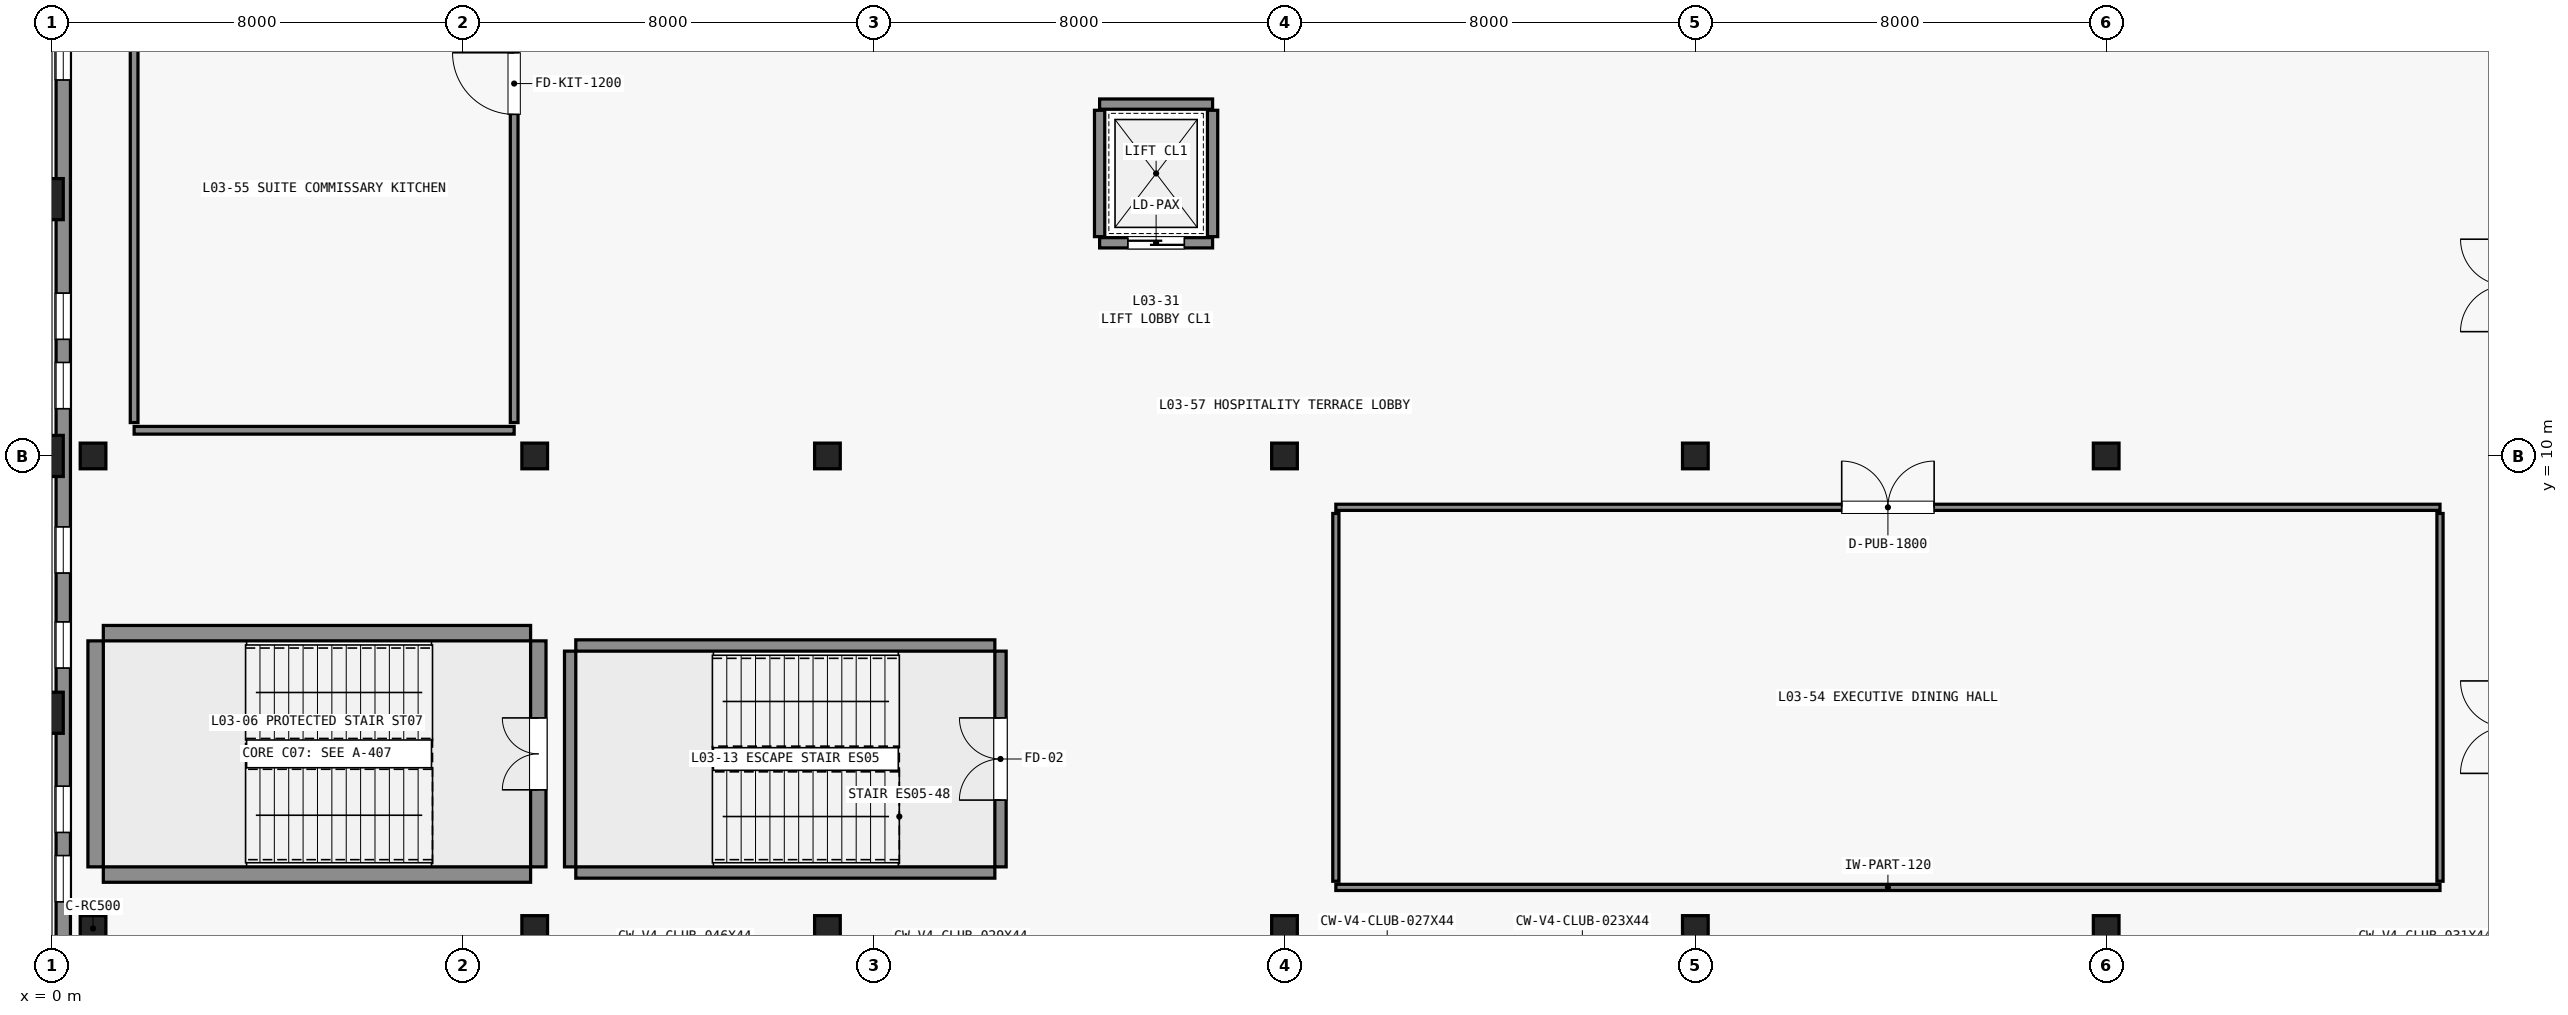
"""IFC4 building model, lengths in metres.
Left out: names, types, materials, properties, quantities, classifications, styles, units other than length and angle.
Written with IfcOpenShell. Run it as: python <this file> out.ifc"""

import sys

from ifc_helpers import new_model, si_unit, direction, frame, frame_2d, origin, origin_2d, place, context, subcontext, project, spatial, rectangle, extrude, element, fill, save


model = new_model("IFC4")
c1 = context("Model", 3, precision=1e-05, world=origin(), true_north=direction((0.0, 1.0)))
c2 = subcontext(c1, "Body", "Model", "MODEL_VIEW")
j1 = project(units=[si_unit("LENGTHUNIT", "METRE"), si_unit("PLANEANGLEUNIT", "RADIAN")], contexts=[c1])
p1 = place(None, origin())
s1 = spatial("IfcSite", under=j1, at=p1, CompositionType="ELEMENT")
p2 = place(p1, origin())
s2 = spatial("IfcBuilding", under=s1, at=p2, CompositionType="ELEMENT")
p3 = place(p2, frame((0.0, 0.0, 16.2)))
s3 = spatial("IfcBuildingStorey", under=s2, at=p3, CompositionType="ELEMENT", Elevation=16.2)
p4 = place(p3, frame((-0.18, 10.0, 0.0), z_axis=(0.0, 0.0, 1.0), x_axis=(1.0, 0.0, 0.0)))
e1 = element("IfcColumn", 1, at=p4, inside=s3, PredefinedType="PILASTER", context=c2, shape_type="SweptSolid", body=[
    extrude(rectangle(XDim=0.8, YDim=0.8, at=origin_2d()), origin(), (0.0, 0.0, 1.0), 4.8),
])
for number, where, z_axis, x_axis in (
    (2, (-0.18, 5.0, 0.0), (0.0, 0.0, 1.0), (1.0, 0.0, 0.0)),
    (3, (-0.18, 15.0, 0.0), (0.0, 0.0, 1.0), (1.0, 0.0, 0.0)),
):
    element("IfcColumn", number, at=place(p3, frame(where, z_axis=z_axis, x_axis=x_axis)), inside=s3, PredefinedType="PILASTER", context=c2, shape_type="SweptSolid", body=[
        extrude(rectangle(XDim=0.8, YDim=0.8, at=origin_2d()), origin(), (0.0, 0.0, 1.0), 4.44),
    ])
for number, where, z_axis, x_axis in (
    (4, (0.8, 0.8, 0.0), (0.0, 0.0, 1.0), (1.0, 0.0, 0.0)),
    (5, (0.8, 10.0, 0.0), (0.0, 0.0, 1.0), (1.0, 0.0, 0.0)),
    (6, (9.4, 0.8, 0.0), (0.0, 0.0, 1.0), (1.0, 0.0, 0.0)),
    (7, (9.4, 10.0, 0.0), (0.0, 0.0, 1.0), (1.0, 0.0, 0.0)),
    (8, (15.1, 0.8, 0.0), (0.0, 0.0, 1.0), (1.0, 0.0, 0.0)),
    (9, (15.1, 10.0, 0.0), (0.0, 0.0, 1.0), (1.0, 0.0, 0.0)),
    (10, (24.0, 0.8, 0.0), (0.0, 0.0, 1.0), (1.0, 0.0, 0.0)),
    (11, (24.0, 10.0, 0.0), (0.0, 0.0, 1.0), (1.0, 0.0, 0.0)),
):
    element("IfcColumn", number, at=place(p3, frame(where, z_axis=z_axis, x_axis=x_axis)), inside=s3, PredefinedType="COLUMN", context=c2, shape_type="SweptSolid", body=[
        extrude(rectangle(XDim=0.5, YDim=0.5, at=origin_2d()), origin(), (0.0, 0.0, 1.0), 4.8),
    ])
for number, where, z_axis, x_axis in (
    (12, (32.0, 0.8, 0.0), (0.0, 0.0, 1.0), (1.0, 0.0, 0.0)),
    (13, (32.0, 10.0, 0.0), (0.0, 0.0, 1.0), (1.0, 0.0, 0.0)),
    (14, (40.0, 0.8, 0.0), (0.0, 0.0, 1.0), (1.0, 0.0, 0.0)),
    (15, (40.0, 10.0, 0.0), (0.0, 0.0, 1.0), (1.0, 0.0, 0.0)),
):
    element("IfcColumn", number, at=place(p3, frame(where, z_axis=z_axis, x_axis=x_axis)), inside=s3, PredefinedType="COLUMN", context=c2, shape_type="SweptSolid", body=[
        extrude(rectangle(XDim=0.5, YDim=0.5, at=origin_2d()), origin(), (0.0, 0.0, 1.0), 4.44),
    ])
for number, where, z_axis, x_axis in (
    (16, (1.0, 1.85, 0.0), (0.0, 0.0, 1.0), (1.0, 0.0, 0.0)),
    (17, (1.0, 6.55, 0.0), (0.0, 0.0, 1.0), (1.0, 0.0, 0.0)),
):
    element("IfcWall", number, at=place(p3, frame(where, z_axis=z_axis, x_axis=x_axis)), inside=s3, PredefinedType="SHEAR", context=c2, shape_type="SweptSolid", body=[
        extrude(rectangle(XDim=8.32, YDim=0.3, at=frame_2d((4.16, 0.0))), origin(), (0.0, 0.0, 1.0), 4.8),
    ])
p5 = place(p3, frame((0.85, 2.0, 0.0), z_axis=(0.0, 0.0, 1.0), x_axis=(0.0, 1.0, 0.0)))
e18 = element("IfcWall", 18, at=p5, inside=s3, PredefinedType="SHEAR", context=c2, shape_type="SweptSolid", body=[
    extrude(rectangle(XDim=4.4, YDim=0.3, at=frame_2d((2.2, 0.0))), origin(), (0.0, 0.0, 1.0), 4.8),
])
p6 = place(p3, frame((9.47, 2.0, 0.0), z_axis=(0.0, 0.0, 1.0), x_axis=(0.0, 1.0, 0.0)))
e19 = element("IfcWall", 19, at=p6, inside=s3, PredefinedType="SHEAR", context=c2, shape_type="SweptSolid", body=[
    extrude(rectangle(XDim=4.4, YDim=0.3, at=frame_2d((2.2, 0.0))), origin(), (0.0, 0.0, 1.0), 4.8),
])
p7 = place(p6, frame((1.5, 0.0, 0.0)))
e20 = element("IfcOpeningElement", 20, at=p7, cuts=e19, PredefinedType="OPENING", context=c2, shape_type="SweptSolid", body=[
    extrude(rectangle(XDim=1.4, YDim=2.2, at=frame_2d((0.7, 1.1))), frame((0.0, 0.16, 0.0), z_axis=(0.0, -1.0, 0.0), x_axis=(1.0, 0.0, 0.0)), (0.0, 0.0, 1.0), 0.32),
])
p8 = place(p3, frame((20.4, 14.15, 0.0), z_axis=(0.0, 0.0, 1.0), x_axis=(1.0, 0.0, 0.0)))
e21 = element("IfcWall", 21, at=p8, inside=s3, PredefinedType="STANDARD", context=c2, shape_type="SweptSolid", body=[
    extrude(rectangle(XDim=2.2, YDim=0.2, at=frame_2d((1.1, 0.0))), origin(), (0.0, 0.0, 1.0), 4.44),
])
p9 = place(p8, frame((0.55, 0.0, 0.0)))
e22 = element("IfcOpeningElement", 22, at=p9, cuts=e21, PredefinedType="OPENING", context=c2, shape_type="SweptSolid", body=[
    extrude(rectangle(XDim=1.1, YDim=2.15, at=frame_2d((0.55, 1.075))), frame((0.0, 0.11, 0.0), z_axis=(0.0, -1.0, 0.0), x_axis=(1.0, 0.0, 0.0)), (0.0, 0.0, 1.0), 0.22),
])
p10 = place(p3, frame((20.4, 16.85, 0.0), z_axis=(0.0, 0.0, 1.0), x_axis=(1.0, 0.0, 0.0)))
e23 = element("IfcWall", 23, at=p10, inside=s3, PredefinedType="STANDARD", context=c2, shape_type="SweptSolid", body=[
    extrude(rectangle(XDim=2.2, YDim=0.2, at=frame_2d((1.1, 0.0))), origin(), (0.0, 0.0, 1.0), 4.44),
])
for number, where, z_axis, x_axis in (
    (24, (20.4, 14.27, 0.0), (0.0, 0.0, 1.0), (0.0, 1.0, 0.0)),
    (25, (22.6, 14.27, 0.0), (0.0, 0.0, 1.0), (0.0, 1.0, 0.0)),
):
    element("IfcWall", number, at=place(p3, frame(where, z_axis=z_axis, x_axis=x_axis)), inside=s3, PredefinedType="STANDARD", context=c2, shape_type="SweptSolid", body=[
        extrude(rectangle(XDim=2.46, YDim=0.2, at=frame_2d((1.23, 0.0))), origin(), (0.0, 0.0, 1.0), 4.44),
    ])
p11 = place(p3, frame((0.22, 0.22, 0.0), z_axis=(0.0, 0.0, 1.0), x_axis=(0.0, 1.0, 0.0)))
e26 = element("IfcWall", 26, at=p11, inside=s3, PredefinedType="STANDARD", context=c2, shape_type="SweptSolid", body=[
    extrude(rectangle(XDim=20.48, YDim=0.28, at=frame_2d((10.24, 0.0))), origin(), (0.0, 0.0, 1.0), 4.44),
])
p12 = place(p11, frame((1.1, 0.0, 0.95)))
e27 = element("IfcOpeningElement", 27, at=p12, cuts=e26, PredefinedType="OPENING", context=c2, shape_type="SweptSolid", body=[
    extrude(rectangle(XDim=0.9, YDim=2.85, at=frame_2d((0.45, 1.425))), frame((0.0, 0.15, 0.0), z_axis=(0.0, -1.0, 0.0), x_axis=(1.0, 0.0, 0.0)), (0.0, 0.0, 1.0), 0.3),
])
p13 = place(p11, frame((2.45, 0.0, 0.95)))
e28 = element("IfcOpeningElement", 28, at=p13, cuts=e26, PredefinedType="OPENING", context=c2, shape_type="SweptSolid", body=[
    extrude(rectangle(XDim=0.9, YDim=2.85, at=frame_2d((0.45, 1.425))), frame((0.0, 0.15, 0.0), z_axis=(0.0, -1.0, 0.0), x_axis=(1.0, 0.0, 0.0)), (0.0, 0.0, 1.0), 0.3),
])
p14 = place(p11, frame((5.65, 0.0, 0.95)))
e29 = element("IfcOpeningElement", 29, at=p14, cuts=e26, PredefinedType="OPENING", context=c2, shape_type="SweptSolid", body=[
    extrude(rectangle(XDim=0.9, YDim=2.85, at=frame_2d((0.45, 1.425))), frame((0.0, 0.15, 0.0), z_axis=(0.0, -1.0, 0.0), x_axis=(1.0, 0.0, 0.0)), (0.0, 0.0, 1.0), 0.3),
])
p15 = place(p11, frame((7.5, 0.0, 0.95)))
e30 = element("IfcOpeningElement", 30, at=p15, cuts=e26, PredefinedType="OPENING", context=c2, shape_type="SweptSolid", body=[
    extrude(rectangle(XDim=0.9, YDim=2.85, at=frame_2d((0.45, 1.425))), frame((0.0, 0.15, 0.0), z_axis=(0.0, -1.0, 0.0), x_axis=(1.0, 0.0, 0.0)), (0.0, 0.0, 1.0), 0.3),
])
p16 = place(p11, frame((10.7, 0.0, 0.95)))
e31 = element("IfcOpeningElement", 31, at=p16, cuts=e26, PredefinedType="OPENING", context=c2, shape_type="SweptSolid", body=[
    extrude(rectangle(XDim=0.9, YDim=2.85, at=frame_2d((0.45, 1.425))), frame((0.0, 0.15, 0.0), z_axis=(0.0, -1.0, 0.0), x_axis=(1.0, 0.0, 0.0)), (0.0, 0.0, 1.0), 0.3),
])
p17 = place(p11, frame((12.05, 0.0, 0.95)))
e32 = element("IfcOpeningElement", 32, at=p17, cuts=e26, PredefinedType="OPENING", context=c2, shape_type="SweptSolid", body=[
    extrude(rectangle(XDim=0.9, YDim=2.85, at=frame_2d((0.45, 1.425))), frame((0.0, 0.15, 0.0), z_axis=(0.0, -1.0, 0.0), x_axis=(1.0, 0.0, 0.0)), (0.0, 0.0, 1.0), 0.3),
])
p18 = place(p11, frame((17.1, 0.0, 0.95)))
e33 = element("IfcOpeningElement", 33, at=p18, cuts=e26, PredefinedType="OPENING", context=c2, shape_type="SweptSolid", body=[
    extrude(rectangle(XDim=0.9, YDim=2.85, at=frame_2d((0.45, 1.425))), frame((0.0, 0.15, 0.0), z_axis=(0.0, -1.0, 0.0), x_axis=(1.0, 0.0, 0.0)), (0.0, 0.0, 1.0), 0.3),
])
for number, where, z_axis, x_axis in (
    (34, (10.2, 1.89, 0.0), (0.0, 0.0, 1.0), (1.0, 0.0, 0.0)),
    (35, (10.2, 6.31, 0.0), (0.0, 0.0, 1.0), (1.0, 0.0, 0.0)),
):
    element("IfcWall", number, at=place(p3, frame(where, z_axis=z_axis, x_axis=x_axis)), inside=s3, PredefinedType="SHEAR", context=c2, shape_type="SweptSolid", body=[
        extrude(rectangle(XDim=8.16, YDim=0.22, at=frame_2d((4.08, 0.0))), origin(), (0.0, 0.0, 1.0), 4.8),
    ])
p19 = place(p3, frame((10.09, 2.0, 0.0), z_axis=(0.0, 0.0, 1.0), x_axis=(0.0, 1.0, 0.0)))
e36 = element("IfcWall", 36, at=p19, inside=s3, PredefinedType="SHEAR", context=c2, shape_type="SweptSolid", body=[
    extrude(rectangle(XDim=4.2, YDim=0.22, at=frame_2d((2.1, 0.0))), origin(), (0.0, 0.0, 1.0), 4.8),
])
p20 = place(p3, frame((18.47, 2.0, 0.0), z_axis=(0.0, 0.0, 1.0), x_axis=(0.0, 1.0, 0.0)))
e37 = element("IfcWall", 37, at=p20, inside=s3, PredefinedType="SHEAR", context=c2, shape_type="SweptSolid", body=[
    extrude(rectangle(XDim=4.2, YDim=0.22, at=frame_2d((2.1, 0.0))), origin(), (0.0, 0.0, 1.0), 4.8),
])
p21 = place(p20, frame((1.3, 0.0, 0.0)))
e38 = element("IfcOpeningElement", 38, at=p21, cuts=e37, PredefinedType="OPENING", context=c2, shape_type="SweptSolid", body=[
    extrude(rectangle(XDim=1.6, YDim=2.2, at=frame_2d((0.8, 1.1))), frame((0.0, 0.12, 0.0), z_axis=(0.0, -1.0, 0.0), x_axis=(1.0, 0.0, 0.0)), (0.0, 0.0, 1.0), 0.24),
])
p22 = place(p3, frame((25.0, 1.6, 0.0), z_axis=(0.0, 0.0, 1.0), x_axis=(1.0, 0.0, 0.0)))
e39 = element("IfcWall", 39, at=p22, inside=s3, PredefinedType="PARTITIONING", context=c2, shape_type="SweptSolid", body=[
    extrude(rectangle(XDim=21.5, YDim=0.12, at=frame_2d((10.75, 0.0))), origin(), (0.0, 0.0, 1.0), 3.69),
])
p23 = place(p3, frame((25.0, 9.0, 0.0), z_axis=(0.0, 0.0, 1.0), x_axis=(1.0, 0.0, 0.0)))
e40 = element("IfcWall", 40, at=p23, inside=s3, PredefinedType="PARTITIONING", context=c2, shape_type="SweptSolid", body=[
    extrude(rectangle(XDim=21.5, YDim=0.12, at=frame_2d((10.75, 0.0))), origin(), (0.0, 0.0, 1.0), 3.69),
])
p24 = place(p23, frame((9.85, 0.0, 0.0)))
e41 = element("IfcOpeningElement", 41, at=p24, cuts=e40, PredefinedType="OPENING", context=c2, shape_type="SweptSolid", body=[
    extrude(rectangle(XDim=1.8, YDim=2.35, at=frame_2d((0.9, 1.175))), frame((0.0, 0.07, 0.0), z_axis=(0.0, -1.0, 0.0), x_axis=(1.0, 0.0, 0.0)), (0.0, 0.0, 1.0), 0.14),
])
for number, where, z_axis, x_axis in (
    (42, (25.0, 1.72, 0.0), (0.0, 0.0, 1.0), (0.0, 1.0, 0.0)),
    (43, (46.5, 1.72, 0.0), (0.0, 0.0, 1.0), (0.0, 1.0, 0.0)),
):
    element("IfcWall", number, at=place(p3, frame(where, z_axis=z_axis, x_axis=x_axis)), inside=s3, PredefinedType="PARTITIONING", context=c2, shape_type="SweptSolid", body=[
        extrude(rectangle(XDim=7.16, YDim=0.12, at=frame_2d((3.58, 0.0))), origin(), (0.0, 0.0, 1.0), 4.44),
    ])
p25 = place(p3, frame((1.6, 10.5, 0.0), z_axis=(0.0, 0.0, 1.0), x_axis=(1.0, 0.0, 0.0)))
e44 = element("IfcWall", 44, at=p25, inside=s3, PredefinedType="STANDARD", context=c2, shape_type="SweptSolid", body=[
    extrude(rectangle(XDim=7.4, YDim=0.15, at=frame_2d((3.7, 0.0))), origin(), (0.0, 0.0, 1.0), 3.69),
])
p26 = place(p3, frame((1.6, 10.65, 0.0), z_axis=(0.0, 0.0, 1.0), x_axis=(0.0, 1.0, 0.0)))
e45 = element("IfcWall", 45, at=p26, inside=s3, PredefinedType="STANDARD", context=c2, shape_type="SweptSolid", body=[
    extrude(rectangle(XDim=13.2, YDim=0.15, at=frame_2d((6.6, 0.0))), origin(), (0.0, 0.0, 1.0), 3.69),
])
p27 = place(p3, frame((9.0, 10.65, 0.0), z_axis=(0.0, 0.0, 1.0), x_axis=(0.0, 1.0, 0.0)))
e46 = element("IfcWall", 46, at=p27, inside=s3, PredefinedType="STANDARD", context=c2, shape_type="SweptSolid", body=[
    extrude(rectangle(XDim=13.2, YDim=0.15, at=frame_2d((6.6, 0.0))), origin(), (0.0, 0.0, 1.0), 3.69),
])
p28 = place(p27, frame((6.0, 0.0, 0.0)))
e47 = element("IfcOpeningElement", 47, at=p28, cuts=e46, PredefinedType="OPENING", context=c2, shape_type="SweptSolid", body=[
    extrude(rectangle(XDim=1.2, YDim=2.2, at=frame_2d((0.6, 1.1))), frame((0.0, 0.085, 0.0), z_axis=(0.0, -1.0, 0.0), x_axis=(1.0, 0.0, 0.0)), (0.0, 0.0, 1.0), 0.17),
])
p29 = place(p9, origin())
e48 = element("IfcDoor", 48, at=p29, inside=s3, OperationType="SLIDING_TO_LEFT", PredefinedType="DOOR", context=c2, shape_type="SweptSolid", body=[
    extrude(rectangle(XDim=1.1, YDim=2.15, at=frame_2d((0.55, 1.075))), frame((0.0, 0.025, 0.0), z_axis=(0.0, -1.0, 0.0), x_axis=(1.0, 0.0, 0.0)), (0.0, 0.0, 1.0), 0.05),
])
fill(e22, e48)
p30 = place(p12, origin())
e49 = element("IfcWindow", 49, at=p30, inside=s3, PartitioningType="DOUBLE_PANEL_VERTICAL", PredefinedType="WINDOW", context=c2, shape_type="SweptSolid", body=[
    extrude(rectangle(XDim=0.9, YDim=2.85, at=frame_2d((0.45, 1.425))), frame((0.0, 0.03, 0.0), z_axis=(0.0, -1.0, 0.0), x_axis=(1.0, 0.0, 0.0)), (0.0, 0.0, 1.0), 0.06),
])
fill(e27, e49)
p31 = place(p13, origin())
e50 = element("IfcWindow", 50, at=p31, inside=s3, PartitioningType="DOUBLE_PANEL_VERTICAL", PredefinedType="WINDOW", context=c2, shape_type="SweptSolid", body=[
    extrude(rectangle(XDim=0.9, YDim=2.85, at=frame_2d((0.45, 1.425))), frame((0.0, 0.03, 0.0), z_axis=(0.0, -1.0, 0.0), x_axis=(1.0, 0.0, 0.0)), (0.0, 0.0, 1.0), 0.06),
])
fill(e28, e50)
p32 = place(p14, origin())
e51 = element("IfcWindow", 51, at=p32, inside=s3, PartitioningType="DOUBLE_PANEL_VERTICAL", PredefinedType="WINDOW", context=c2, shape_type="SweptSolid", body=[
    extrude(rectangle(XDim=0.9, YDim=2.85, at=frame_2d((0.45, 1.425))), frame((0.0, 0.03, 0.0), z_axis=(0.0, -1.0, 0.0), x_axis=(1.0, 0.0, 0.0)), (0.0, 0.0, 1.0), 0.06),
])
fill(e29, e51)
p33 = place(p15, origin())
e52 = element("IfcWindow", 52, at=p33, inside=s3, PartitioningType="DOUBLE_PANEL_VERTICAL", PredefinedType="WINDOW", context=c2, shape_type="SweptSolid", body=[
    extrude(rectangle(XDim=0.9, YDim=2.85, at=frame_2d((0.45, 1.425))), frame((0.0, 0.03, 0.0), z_axis=(0.0, -1.0, 0.0), x_axis=(1.0, 0.0, 0.0)), (0.0, 0.0, 1.0), 0.06),
])
fill(e30, e52)
p34 = place(p16, origin())
e53 = element("IfcWindow", 53, at=p34, inside=s3, PartitioningType="DOUBLE_PANEL_VERTICAL", PredefinedType="WINDOW", context=c2, shape_type="SweptSolid", body=[
    extrude(rectangle(XDim=0.9, YDim=2.85, at=frame_2d((0.45, 1.425))), frame((0.0, 0.03, 0.0), z_axis=(0.0, -1.0, 0.0), x_axis=(1.0, 0.0, 0.0)), (0.0, 0.0, 1.0), 0.06),
])
fill(e31, e53)
p35 = place(p17, origin())
e54 = element("IfcWindow", 54, at=p35, inside=s3, PartitioningType="DOUBLE_PANEL_VERTICAL", PredefinedType="WINDOW", context=c2, shape_type="SweptSolid", body=[
    extrude(rectangle(XDim=0.9, YDim=2.85, at=frame_2d((0.45, 1.425))), frame((0.0, 0.03, 0.0), z_axis=(0.0, -1.0, 0.0), x_axis=(1.0, 0.0, 0.0)), (0.0, 0.0, 1.0), 0.06),
])
fill(e32, e54)
p36 = place(p18, origin())
e55 = element("IfcWindow", 55, at=p36, inside=s3, PartitioningType="DOUBLE_PANEL_VERTICAL", PredefinedType="WINDOW", context=c2, shape_type="SweptSolid", body=[
    extrude(rectangle(XDim=0.9, YDim=2.85, at=frame_2d((0.45, 1.425))), frame((0.0, 0.03, 0.0), z_axis=(0.0, -1.0, 0.0), x_axis=(1.0, 0.0, 0.0)), (0.0, 0.0, 1.0), 0.06),
])
fill(e33, e55)
p37 = place(p7, origin())
e56 = element("IfcDoor", 56, at=p37, inside=s3, OperationType="DOUBLE_DOOR_SINGLE_SWING", PredefinedType="DOOR", context=c2, shape_type="SweptSolid", body=[
    extrude(rectangle(XDim=1.4, YDim=2.2, at=frame_2d((0.7, 1.1))), frame((0.0, 0.025, 0.0), z_axis=(0.0, -1.0, 0.0), x_axis=(1.0, 0.0, 0.0)), (0.0, 0.0, 1.0), 0.05),
])
fill(e20, e56)
p38 = place(p21, origin())
e57 = element("IfcDoor", 57, at=p38, inside=s3, OperationType="DOUBLE_DOOR_SINGLE_SWING", PredefinedType="DOOR", context=c2, shape_type="SweptSolid", body=[
    extrude(rectangle(XDim=1.6, YDim=2.2, at=frame_2d((0.8, 1.1))), frame((0.0, 0.025, 0.0), z_axis=(0.0, -1.0, 0.0), x_axis=(1.0, 0.0, 0.0)), (0.0, 0.0, 1.0), 0.05),
])
fill(e38, e57)
p39 = place(p24, origin())
e58 = element("IfcDoor", 58, at=p39, inside=s3, OperationType="DOUBLE_DOOR_SINGLE_SWING", PredefinedType="DOOR", context=c2, shape_type="SweptSolid", body=[
    extrude(rectangle(XDim=1.8, YDim=2.35, at=frame_2d((0.9, 1.175))), frame((0.0, 0.025, 0.0), z_axis=(0.0, -1.0, 0.0), x_axis=(1.0, 0.0, 0.0)), (0.0, 0.0, 1.0), 0.05),
])
fill(e41, e58)
p40 = place(p28, origin())
e59 = element("IfcDoor", 59, at=p40, inside=s3, OperationType="SINGLE_SWING_RIGHT", PredefinedType="DOOR", context=c2, shape_type="SweptSolid", body=[
    extrude(rectangle(XDim=1.2, YDim=2.2, at=frame_2d((0.6, 1.1))), frame((0.0, 0.025, 0.0), z_axis=(0.0, -1.0, 0.0), x_axis=(1.0, 0.0, 0.0)), (0.0, 0.0, 1.0), 0.05),
])
fill(e47, e59)
save(model, sys.argv[1])
